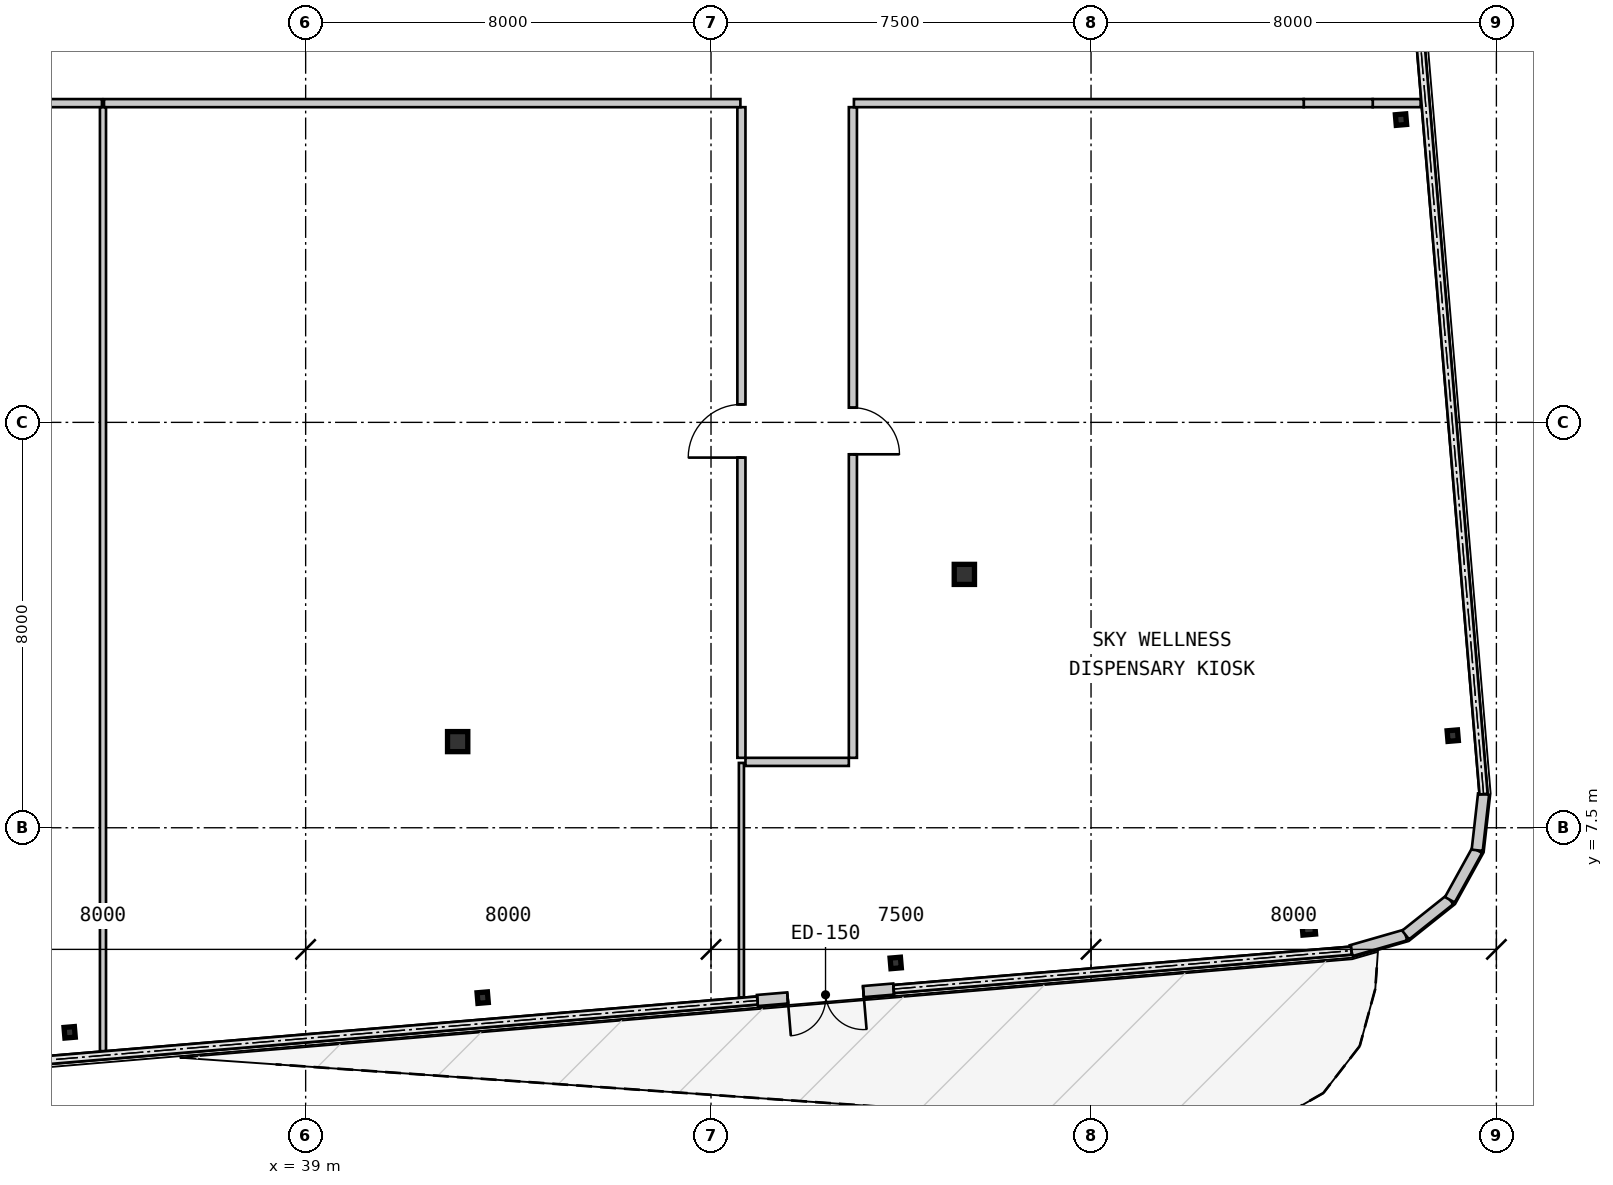
"""IFC4 building model, lengths in metres.
Left out: names, types, materials, properties, quantities, classifications, styles, units other than length and angle.
Written with IfcOpenShell. Run it as: python <this file> out.ifc"""

import sys

from ifc_helpers import new_model, si_unit, direction, frame, frame_2d, origin, origin_2d, place, context, subcontext, project, spatial, rectangle, hollow_rectangle, i_section, extrude, source, transform, mapped, element, fill, save


model = new_model("IFC4")
c1 = context("Model", 3, precision=1e-05, world=origin(), true_north=direction((0.0, 1.0)))
c2 = subcontext(c1, "Body", "Model", "MODEL_VIEW")
j1 = project(units=[si_unit("LENGTHUNIT", "METRE"), si_unit("PLANEANGLEUNIT", "RADIAN")], contexts=[c1])
p1 = place(None, origin())
s1 = spatial("IfcSite", under=j1, at=p1, CompositionType="ELEMENT")
p2 = place(p1, origin())
s2 = spatial("IfcBuilding", under=s1, at=p2, CompositionType="ELEMENT")
p3 = place(p2, frame((0.0, 0.0, 168.7)))
s3 = spatial("IfcBuildingStorey", under=s2, at=p3, CompositionType="ELEMENT", Elevation=168.7)
m1 = source(origin(), c2, "Body", "SweptSolid", [
    extrude(i_section(OverallWidth=0.4, OverallDepth=0.396, WebThickness=0.022, FlangeThickness=0.034, at=origin_2d()), origin(), (0.0, 0.0, 1.0), 3.85),
])
for number, where, z_axis, x_axis in (
    (1, (42.0, 9.2, 0.0), (0.0, 0.0, 1.0), (1.0, 0.0, 0.0)),
    (2, (52.0, 12.5, 0.0), (0.0, 0.0, 1.0), (1.0, 0.0, 0.0)),
):
    element("IfcColumn", number, at=place(p3, frame(where, z_axis=z_axis, x_axis=x_axis)), inside=s3, PredefinedType="COLUMN", context=c2, shape_type="MappedRepresentation", body=[
        mapped(m1, transform((0.0, 0.0, 0.0), scale=1.0)),
    ])
m2 = source(origin(), c2, "Body", "SweptSolid", [
    extrude(i_section(OverallWidth=0.205, OverallDepth=0.21, WebThickness=0.009, FlangeThickness=0.014, at=origin_2d()), origin(), (0.0, 0.0, 1.0), 3.85),
])
for number, where, z_axis, x_axis in (
    (3, (34.342, 3.463, 0.0), (0.0, 0.0, 1.0), (0.996, 0.084, 0.0)),
    (4, (42.494, 4.147, 0.0), (0.0, 0.0, 1.0), (0.996, 0.084, 0.0)),
    (5, (50.645, 4.832, 0.0), (0.0, 0.0, 1.0), (0.996, 0.084, 0.0)),
):
    element("IfcColumn", number, at=place(p3, frame(where, z_axis=z_axis, x_axis=x_axis)), inside=s3, PredefinedType="COLUMN", context=c2, shape_type="MappedRepresentation", body=[
        mapped(m2, transform((0.0, 0.0, 0.0), scale=1.0)),
    ])
m3 = source(origin(), c2, "Body", "SweptSolid", [
    extrude(hollow_rectangle(XDim=0.25, YDim=0.25, WallThickness=0.01, at=origin_2d()), origin(), (0.0, 0.0, 1.0), 3.85),
])
p4 = place(p3, frame((58.796, 5.516, 0.0), z_axis=(0.0, 0.0, 1.0), x_axis=(0.99649285925, 0.083677843332, 0.0)))
e6 = element("IfcColumn", 6, at=p4, inside=s3, PredefinedType="COLUMN", context=c2, shape_type="MappedRepresentation", body=[
    mapped(m3, transform((0.0, 0.0, 0.0), scale=1.0)),
])
for number, where, z_axis, x_axis in (
    (7, (61.638, 9.318, 0.0), (0.0, 0.0, 1.0), (0.996, 0.084, 0.0)),
    (8, (60.617, 21.475, 0.0), (0.0, 0.0, 1.0), (0.996, 0.084, 0.0)),
):
    element("IfcColumn", number, at=place(p3, frame(where, z_axis=z_axis, x_axis=x_axis)), inside=s3, PredefinedType="COLUMN", context=c2, shape_type="MappedRepresentation", body=[
        mapped(m2, transform((0.0, 0.0, 0.0), scale=1.0)),
    ])
m4 = source(origin(), c2, "Body", "SweptSolid", [
    extrude(rectangle(XDim=1.116, YDim=0.22, at=frame_2d((0.558, 0.0))), origin(), (0.0, 0.0, 1.0), 3.63),
])
for number, where, z_axis, x_axis in (
    (9, (59.636, 5.075, 0.0), (0.0, 0.0, 1.0), (0.961, 0.277, 0.0)),
    (10, (60.708, 5.384, 0.0), (0.0, 0.0, 1.0), (0.782, 0.623, 0.0)),
    (11, (61.581, 6.079, 0.0), (0.0, 0.0, 1.0), (0.484, 0.875, 0.0)),
    (12, (62.121, 7.056, 0.0), (0.0, 0.0, 1.0), (0.112, 0.994, 0.0)),
):
    element("IfcWall", number, at=place(p3, frame(where, z_axis=z_axis, x_axis=x_axis)), inside=s3, PredefinedType="SOLIDWALL", context=c2, shape_type="MappedRepresentation", body=[
        mapped(m4, transform((0.0, 0.0, 0.0), scale=1.0)),
    ])
m5 = source(origin(), c2, "Body", "SweptSolid", [
    extrude(rectangle(XDim=2.7, YDim=0.22, at=frame_2d((1.35, 0.0))), origin(), (0.0, 0.0, 1.0), 3.63),
])
p5 = place(p3, frame((47.915, 4.091, 0.0), z_axis=(0.0, 0.0, 1.0), x_axis=(0.99648878097, 0.083726396078, 0.0)))
e13 = element("IfcWall", 13, at=p5, inside=s3, PredefinedType="SOLIDWALL", context=c2, shape_type="MappedRepresentation", body=[
    mapped(m5, transform((0.0, 0.0, 0.0), scale=1.0)),
])
m6 = source(origin(), c2, "Body", "SweptSolid", [
    extrude(rectangle(XDim=1.5, YDim=2.2, at=frame_2d((0.75, 1.1))), frame((0.0, 0.12, 0.0), z_axis=(0.0, -1.0, 0.0), x_axis=(1.0, 0.0, 0.0)), (0.0, 0.0, 1.0), 0.24),
])
p6 = place(p5, frame((0.6, 0.0, 0.0)))
e14 = element("IfcOpeningElement", 14, at=p6, cuts=e13, PredefinedType="OPENING", context=c2, shape_type="MappedRepresentation", body=[
    mapped(m6, transform((0.0, 0.0, 0.0), scale=1.0)),
])
m7 = source(origin(), c2, "Body", "SweptSolid", [
    extrude(rectangle(XDim=12.559, YDim=0.16, at=frame_2d((6.28, 0.0))), origin(), (0.0, 0.0, 1.0), 3.63),
])
p7 = place(p3, frame((34.98, 21.8, 0.0), z_axis=(0.0, 0.0, 1.0), x_axis=(-1.0, 0.0, 0.0)))
e15 = element("IfcWall", 15, at=p7, inside=s3, PredefinedType="PARTITIONING", context=c2, shape_type="MappedRepresentation", body=[
    mapped(m7, transform((0.0, 0.0, 0.0), scale=1.0)),
])
m8 = source(origin(), c2, "Body", "SweptSolid", [
    extrude(rectangle(XDim=12.84, YDim=0.16, at=frame_2d((6.42, 0.0))), origin(), (0.0, 0.0, 1.0), 3.63),
])
p8 = place(p3, frame((47.6, 8.88, 0.0), z_axis=(0.0, 0.0, 1.0), x_axis=(0.0, 1.0, 0.0)))
e16 = element("IfcWall", 16, at=p8, inside=s3, PredefinedType="PARTITIONING", context=c2, shape_type="MappedRepresentation", body=[
    mapped(m8, transform((0.0, 0.0, 0.0), scale=1.0)),
])
m9 = source(origin(), c2, "Body", "SweptSolid", [
    extrude(rectangle(XDim=1.05, YDim=2.1, at=frame_2d((0.525, 1.05))), frame((0.0, 0.09, 0.0), z_axis=(0.0, -1.0, 0.0), x_axis=(1.0, 0.0, 0.0)), (0.0, 0.0, 1.0), 0.18),
])
p9 = place(p8, frame((5.925, 0.0, 0.0)))
e17 = element("IfcOpeningElement", 17, at=p9, cuts=e16, PredefinedType="OPENING", context=c2, shape_type="MappedRepresentation", body=[
    mapped(m9, transform((0.0, 0.0, 0.0), scale=1.0)),
])
p10 = place(p3, frame((47.58, 21.8, 0.0), z_axis=(0.0, 0.0, 1.0), x_axis=(-1.0, 0.0, 0.0)))
e18 = element("IfcWall", 18, at=p10, inside=s3, PredefinedType="PARTITIONING", context=c2, shape_type="MappedRepresentation", body=[
    mapped(m7, transform((0.0, 0.0, 0.0), scale=1.0)),
])
p11 = place(p3, frame((49.8, 21.72, 0.0), z_axis=(0.0, 0.0, 1.0), x_axis=(0.0, -1.0, 0.0)))
e19 = element("IfcWall", 19, at=p11, inside=s3, PredefinedType="PARTITIONING", context=c2, shape_type="MappedRepresentation", body=[
    mapped(m8, transform((0.0, 0.0, 0.0), scale=1.0)),
])
m10 = source(origin(), c2, "Body", "SweptSolid", [
    extrude(rectangle(XDim=0.92, YDim=2.1, at=frame_2d((0.46, 1.05))), frame((0.0, 0.09, 0.0), z_axis=(0.0, -1.0, 0.0), x_axis=(1.0, 0.0, 0.0)), (0.0, 0.0, 1.0), 0.18),
])
p12 = place(p11, frame((5.93, 0.0, 0.0)))
e20 = element("IfcOpeningElement", 20, at=p12, cuts=e19, PredefinedType="OPENING", context=c2, shape_type="MappedRepresentation", body=[
    mapped(m10, transform((0.0, 0.0, 0.0), scale=1.0)),
])
m11 = source(origin(), c2, "Body", "SweptSolid", [
    extrude(rectangle(XDim=0.945, YDim=0.16, at=frame_2d((0.473, 0.0))), origin(), (0.0, 0.0, 1.0), 3.63),
])
p13 = place(p3, frame((61.005, 21.8, 0.0), z_axis=(0.0, 0.0, 1.0), x_axis=(-1.0, 0.0, 0.0)))
e21 = element("IfcWall", 21, at=p13, inside=s3, PredefinedType="PARTITIONING", context=c2, shape_type="MappedRepresentation", body=[
    mapped(m11, transform((0.0, 0.0, 0.0), scale=1.0)),
])
m12 = source(origin(), c2, "Body", "SweptSolid", [
    extrude(rectangle(XDim=1.361, YDim=0.16, at=frame_2d((0.681, 0.0))), origin(), (0.0, 0.0, 1.0), 3.17),
])
p14 = place(p3, frame((60.059, 21.8, 0.0), z_axis=(0.0, 0.0, 1.0), x_axis=(-1.0, 0.0, 0.0)))
e22 = element("IfcWall", 22, at=p14, inside=s3, PredefinedType="PARTITIONING", context=c2, shape_type="MappedRepresentation", body=[
    mapped(m12, transform((0.0, 0.0, 0.0), scale=1.0)),
])
m13 = source(origin(), c2, "Body", "SweptSolid", [
    extrude(rectangle(XDim=8.878, YDim=0.16, at=frame_2d((4.439, 0.0))), origin(), (0.0, 0.0, 1.0), 3.63),
])
p15 = place(p3, frame((58.698, 21.8, 0.0), z_axis=(0.0, 0.0, 1.0), x_axis=(-1.0, 0.0, 0.0)))
e23 = element("IfcWall", 23, at=p15, inside=s3, PredefinedType="PARTITIONING", context=c2, shape_type="MappedRepresentation", body=[
    mapped(m13, transform((0.0, 0.0, 0.0), scale=1.0)),
])
m14 = source(origin(), c2, "Body", "SweptSolid", [
    extrude(rectangle(XDim=2.04, YDim=0.16, at=frame_2d((1.02, 0.0))), origin(), (0.0, 0.0, 1.0), 3.63),
])
p16 = place(p3, frame((49.72, 8.8, 0.0), z_axis=(0.0, 0.0, 1.0), x_axis=(-1.0, 0.0, 0.0)))
e24 = element("IfcWall", 24, at=p16, inside=s3, PredefinedType="PARTITIONING", context=c2, shape_type="MappedRepresentation", body=[
    mapped(m14, transform((0.0, 0.0, 0.0), scale=1.0)),
])
m15 = source(origin(), c2, "Body", "SweptSolid", [
    extrude(rectangle(XDim=18.626, YDim=0.12, at=frame_2d((9.313, 0.0))), origin(), (0.0, 0.0, 1.0), 3.63),
])
p17 = place(p3, frame((35.0, 21.718, 0.0), z_axis=(0.0, 0.0, 1.0), x_axis=(0.0, -1.0, 0.0)))
e25 = element("IfcWall", 25, at=p17, inside=s3, PredefinedType="PARTITIONING", context=c2, shape_type="MappedRepresentation", body=[
    mapped(m15, transform((0.0, 0.0, 0.0), scale=1.0)),
])
m16 = source(origin(), c2, "Body", "SweptSolid", [
    extrude(rectangle(XDim=4.63, YDim=0.1, at=frame_2d((2.315, 0.0))), origin(), (0.0, 0.0, 1.0), 3.63),
])
p18 = place(p3, frame((47.6, 8.78, 0.0), z_axis=(0.0, 0.0, 1.0), x_axis=(0.0, -1.0, 0.0)))
e26 = element("IfcWall", 26, at=p18, inside=s3, PredefinedType="MOVABLE", context=c2, shape_type="MappedRepresentation", body=[
    mapped(m16, transform((0.0, 0.0, 0.0), scale=1.0)),
])
m17 = source(origin(), c2, "Body", "SweptSolid", [
    extrude(rectangle(XDim=1.5, YDim=2.2, at=frame_2d((0.75, 1.1))), frame((0.0, 0.025, 0.0), z_axis=(0.0, -1.0, 0.0), x_axis=(1.0, 0.0, 0.0)), (0.0, 0.0, 1.0), 0.05),
])
p19 = place(p6, frame((1.5, 0.0, 0.0), z_axis=(0.0, 0.0, 1.0), x_axis=(-1.0, 0.0, 0.0)))
e27 = element("IfcDoor", 27, at=p19, inside=s3, OperationType="DOUBLE_DOOR_SINGLE_SWING", PredefinedType="DOOR", context=c2, shape_type="MappedRepresentation", body=[
    mapped(m17, transform((0.0, 0.0, 0.0), scale=1.0)),
])
fill(e14, e27)
m18 = source(origin(), c2, "Body", "SweptSolid", [
    extrude(rectangle(XDim=1.05, YDim=2.1, at=frame_2d((0.525, 1.05))), frame((0.0, 0.025, 0.0), z_axis=(0.0, -1.0, 0.0), x_axis=(1.0, 0.0, 0.0)), (0.0, 0.0, 1.0), 0.05),
])
p20 = place(p9, origin())
e28 = element("IfcDoor", 28, at=p20, inside=s3, OperationType="SINGLE_SWING_LEFT", PredefinedType="DOOR", context=c2, shape_type="MappedRepresentation", body=[
    mapped(m18, transform((0.0, 0.0, 0.0), scale=1.0)),
])
fill(e17, e28)
m19 = source(origin(), c2, "Body", "SweptSolid", [
    extrude(rectangle(XDim=0.92, YDim=2.1, at=frame_2d((0.46, 1.05))), frame((0.0, 0.025, 0.0), z_axis=(0.0, -1.0, 0.0), x_axis=(1.0, 0.0, 0.0)), (0.0, 0.0, 1.0), 0.05),
])
p21 = place(p12, origin())
e29 = element("IfcDoor", 29, at=p21, inside=s3, OperationType="SINGLE_SWING_RIGHT", PredefinedType="DOOR", context=c2, shape_type="MappedRepresentation", body=[
    mapped(m19, transform((0.0, 0.0, 0.0), scale=1.0)),
])
fill(e20, e29)
save(model, sys.argv[1])
